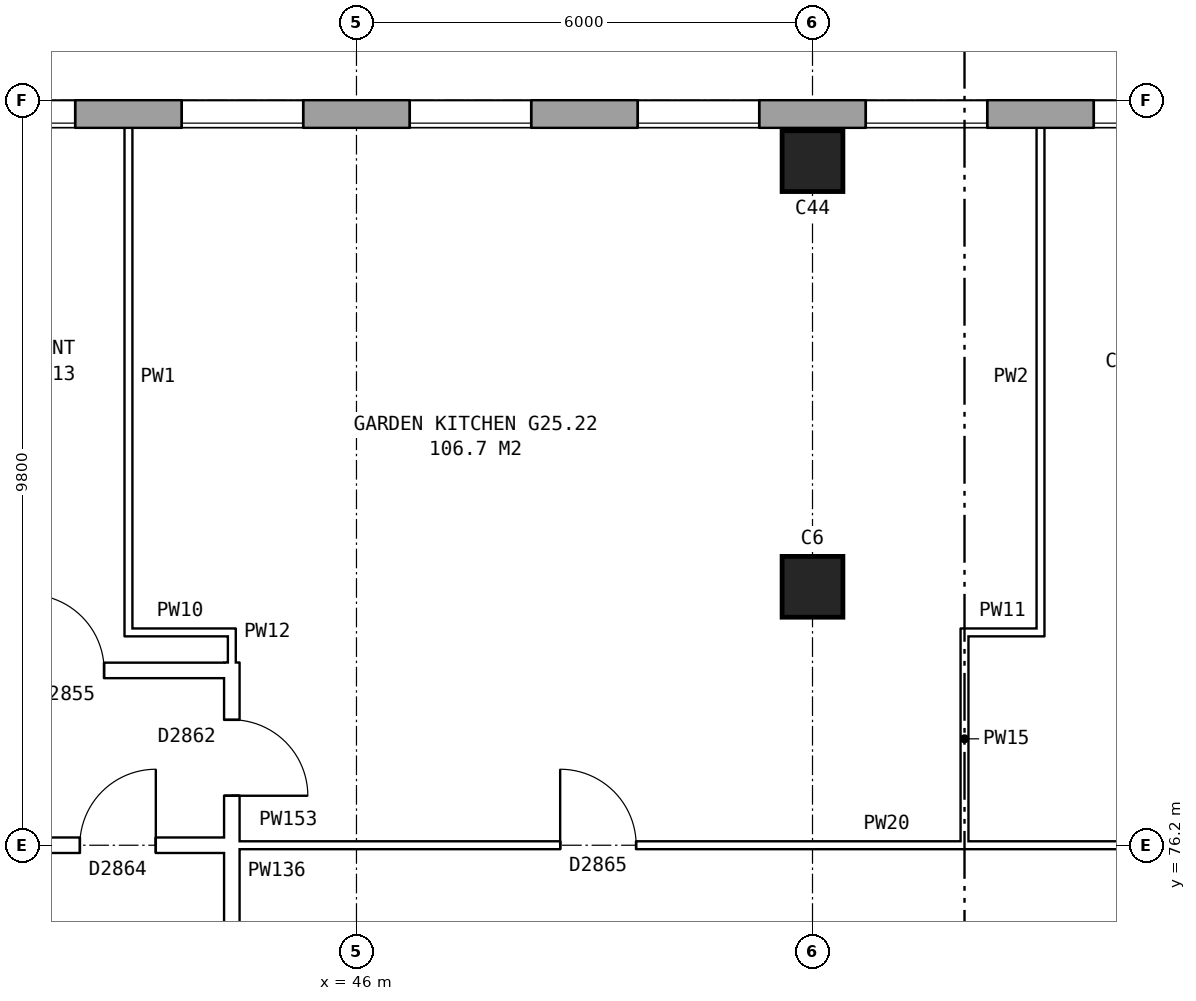
"""IFC4 building model, lengths in metres.
Left out: names, types, materials, properties, quantities, classifications, styles, units other than length and angle.
Written with IfcOpenShell. Run it as: python <this file> out.ifc"""

import sys

from ifc_helpers import new_model, si_unit, direction, frame, frame_2d, origin, origin_2d, place, context, subcontext, project, spatial, rectangle, extrude, element, fill, save


model = new_model("IFC4")
c1 = context("Model", 3, precision=1e-05, world=origin(), true_north=direction((0.0, 1.0)))
c2 = subcontext(c1, "Body", "Model", "MODEL_VIEW")
j1 = project(units=[si_unit("LENGTHUNIT", "METRE"), si_unit("PLANEANGLEUNIT", "RADIAN")], contexts=[c1])
p1 = place(None, origin())
s1 = spatial("IfcSite", under=j1, at=p1, CompositionType="ELEMENT")
p2 = place(p1, origin())
s2 = spatial("IfcBuilding", under=s1, at=p2, CompositionType="ELEMENT")
p3 = place(p2, frame((0.0, 0.0, 90.2)))
s3 = spatial("IfcBuildingStorey", under=s2, at=p3, CompositionType="ELEMENT", Elevation=90.2)
for number, where, z_axis, x_axis in (
    (1, (52.0, 79.6, 0.0), (0.0, 0.0, 1.0), (1.0, 0.0, 0.0)),
    (2, (52.0, 85.2, 0.0), (0.0, 0.0, 1.0), (1.0, 0.0, 0.0)),
):
    element("IfcColumn", number, at=place(p3, frame(where, z_axis=z_axis, x_axis=x_axis)), inside=s3, PredefinedType="COLUMN", context=c2, shape_type="SweptSolid", body=[
        extrude(rectangle(XDim=0.8, YDim=0.8, at=origin_2d()), origin(), (0.0, 0.0, 1.0), 5.6),
    ])
p4 = place(p3, frame((72.925, 85.82, 0.0), z_axis=(0.0, 0.0, 1.0), x_axis=(-1.0, 0.0, 0.0)))
e3 = element("IfcWall", 3, at=p4, inside=s3, PredefinedType="STANDARD", context=c2, shape_type="SweptSolid", body=[
    extrude(rectangle(XDim=44.851, YDim=0.36, at=frame_2d((22.425, 0.0))), origin(), (0.0, 0.0, 1.0), 5.6),
])
p5 = place(p4, frame((0.625, 0.0, 0.15)))
e4 = element("IfcOpeningElement", 4, at=p5, cuts=e3, PredefinedType="OPENING", context=c2, shape_type="SweptSolid", body=[
    extrude(rectangle(XDim=1.6, YDim=2.4, at=frame_2d((0.8, 1.2))), frame((0.0, 0.19, 0.0), z_axis=(0.0, -1.0, 0.0), x_axis=(1.0, 0.0, 0.0)), (0.0, 0.0, 1.0), 0.38),
])
p6 = place(p4, frame((3.625, 0.0, 0.15)))
e5 = element("IfcOpeningElement", 5, at=p6, cuts=e3, PredefinedType="OPENING", context=c2, shape_type="SweptSolid", body=[
    extrude(rectangle(XDim=1.6, YDim=2.4, at=frame_2d((0.8, 1.2))), frame((0.0, 0.19, 0.0), z_axis=(0.0, -1.0, 0.0), x_axis=(1.0, 0.0, 0.0)), (0.0, 0.0, 1.0), 0.38),
])
p7 = place(p4, frame((6.625, 0.0, 0.15)))
e6 = element("IfcOpeningElement", 6, at=p7, cuts=e3, PredefinedType="OPENING", context=c2, shape_type="SweptSolid", body=[
    extrude(rectangle(XDim=1.6, YDim=2.4, at=frame_2d((0.8, 1.2))), frame((0.0, 0.19, 0.0), z_axis=(0.0, -1.0, 0.0), x_axis=(1.0, 0.0, 0.0)), (0.0, 0.0, 1.0), 0.38),
])
p8 = place(p4, frame((9.625, 0.0, 0.15)))
e7 = element("IfcOpeningElement", 7, at=p8, cuts=e3, PredefinedType="OPENING", context=c2, shape_type="SweptSolid", body=[
    extrude(rectangle(XDim=1.6, YDim=2.4, at=frame_2d((0.8, 1.2))), frame((0.0, 0.19, 0.0), z_axis=(0.0, -1.0, 0.0), x_axis=(1.0, 0.0, 0.0)), (0.0, 0.0, 1.0), 0.38),
])
p9 = place(p4, frame((12.625, 0.0, 0.15)))
e8 = element("IfcOpeningElement", 8, at=p9, cuts=e3, PredefinedType="OPENING", context=c2, shape_type="SweptSolid", body=[
    extrude(rectangle(XDim=1.6, YDim=2.4, at=frame_2d((0.8, 1.2))), frame((0.0, 0.19, 0.0), z_axis=(0.0, -1.0, 0.0), x_axis=(1.0, 0.0, 0.0)), (0.0, 0.0, 1.0), 0.38),
])
p10 = place(p4, frame((15.625, 0.0, 0.15)))
e9 = element("IfcOpeningElement", 9, at=p10, cuts=e3, PredefinedType="OPENING", context=c2, shape_type="SweptSolid", body=[
    extrude(rectangle(XDim=1.6, YDim=2.4, at=frame_2d((0.8, 1.2))), frame((0.0, 0.19, 0.0), z_axis=(0.0, -1.0, 0.0), x_axis=(1.0, 0.0, 0.0)), (0.0, 0.0, 1.0), 0.38),
])
p11 = place(p4, frame((18.625, 0.0, 0.15)))
e10 = element("IfcOpeningElement", 10, at=p11, cuts=e3, PredefinedType="OPENING", context=c2, shape_type="SweptSolid", body=[
    extrude(rectangle(XDim=1.6, YDim=2.4, at=frame_2d((0.8, 1.2))), frame((0.0, 0.19, 0.0), z_axis=(0.0, -1.0, 0.0), x_axis=(1.0, 0.0, 0.0)), (0.0, 0.0, 1.0), 0.38),
])
p12 = place(p4, frame((21.625, 0.0, 0.15)))
e11 = element("IfcOpeningElement", 11, at=p12, cuts=e3, PredefinedType="OPENING", context=c2, shape_type="SweptSolid", body=[
    extrude(rectangle(XDim=1.6, YDim=2.4, at=frame_2d((0.8, 1.2))), frame((0.0, 0.19, 0.0), z_axis=(0.0, -1.0, 0.0), x_axis=(1.0, 0.0, 0.0)), (0.0, 0.0, 1.0), 0.38),
])
p13 = place(p4, frame((24.625, 0.0, 0.15)))
e12 = element("IfcOpeningElement", 12, at=p13, cuts=e3, PredefinedType="OPENING", context=c2, shape_type="SweptSolid", body=[
    extrude(rectangle(XDim=1.6, YDim=2.4, at=frame_2d((0.8, 1.2))), frame((0.0, 0.19, 0.0), z_axis=(0.0, -1.0, 0.0), x_axis=(1.0, 0.0, 0.0)), (0.0, 0.0, 1.0), 0.38),
])
p14 = place(p4, frame((27.625, 0.0, 0.15)))
e13 = element("IfcOpeningElement", 13, at=p14, cuts=e3, PredefinedType="OPENING", context=c2, shape_type="SweptSolid", body=[
    extrude(rectangle(XDim=1.6, YDim=2.4, at=frame_2d((0.8, 1.2))), frame((0.0, 0.19, 0.0), z_axis=(0.0, -1.0, 0.0), x_axis=(1.0, 0.0, 0.0)), (0.0, 0.0, 1.0), 0.38),
])
p15 = place(p4, frame((30.625, 0.0, 0.15)))
e14 = element("IfcOpeningElement", 14, at=p15, cuts=e3, PredefinedType="OPENING", context=c2, shape_type="SweptSolid", body=[
    extrude(rectangle(XDim=1.6, YDim=2.4, at=frame_2d((0.8, 1.2))), frame((0.0, 0.19, 0.0), z_axis=(0.0, -1.0, 0.0), x_axis=(1.0, 0.0, 0.0)), (0.0, 0.0, 1.0), 0.38),
])
p16 = place(p4, frame((33.625, 0.0, 0.15)))
e15 = element("IfcOpeningElement", 15, at=p16, cuts=e3, PredefinedType="OPENING", context=c2, shape_type="SweptSolid", body=[
    extrude(rectangle(XDim=1.6, YDim=2.4, at=frame_2d((0.8, 1.2))), frame((0.0, 0.19, 0.0), z_axis=(0.0, -1.0, 0.0), x_axis=(1.0, 0.0, 0.0)), (0.0, 0.0, 1.0), 0.38),
])
p17 = place(p4, frame((36.625, 0.0, 0.15)))
e16 = element("IfcOpeningElement", 16, at=p17, cuts=e3, PredefinedType="OPENING", context=c2, shape_type="SweptSolid", body=[
    extrude(rectangle(XDim=1.6, YDim=2.4, at=frame_2d((0.8, 1.2))), frame((0.0, 0.19, 0.0), z_axis=(0.0, -1.0, 0.0), x_axis=(1.0, 0.0, 0.0)), (0.0, 0.0, 1.0), 0.38),
])
p18 = place(p4, frame((39.625, 0.0, 0.15)))
e17 = element("IfcOpeningElement", 17, at=p18, cuts=e3, PredefinedType="OPENING", context=c2, shape_type="SweptSolid", body=[
    extrude(rectangle(XDim=1.6, YDim=2.4, at=frame_2d((0.8, 1.2))), frame((0.0, 0.19, 0.0), z_axis=(0.0, -1.0, 0.0), x_axis=(1.0, 0.0, 0.0)), (0.0, 0.0, 1.0), 0.38),
])
p19 = place(p4, frame((42.625, 0.0, 0.15)))
e18 = element("IfcOpeningElement", 18, at=p19, cuts=e3, PredefinedType="OPENING", context=c2, shape_type="SweptSolid", body=[
    extrude(rectangle(XDim=1.6, YDim=2.4, at=frame_2d((0.8, 1.2))), frame((0.0, 0.19, 0.0), z_axis=(0.0, -1.0, 0.0), x_axis=(1.0, 0.0, 0.0)), (0.0, 0.0, 1.0), 0.38),
])
p20 = place(p3, frame((44.36, 63.9, 0.0), z_axis=(0.0, 0.0, 1.0), x_axis=(0.0, 1.0, 0.0)))
e19 = element("IfcWall", 19, at=p20, inside=s3, PredefinedType="PARTITIONING", context=c2, shape_type="SweptSolid", body=[
    extrude(rectangle(XDim=12.2, YDim=0.2, at=frame_2d((6.1, 0.0))), origin(), (0.0, 0.0, 1.0), 5.6),
])
p21 = place(p20, frame((5.1, 0.0, 0.0)))
e20 = element("IfcOpeningElement", 20, at=p21, cuts=e19, PredefinedType="OPENING", context=c2, shape_type="SweptSolid", body=[
    extrude(rectangle(XDim=2.0, YDim=2.1, at=frame_2d((1.0, 1.05))), frame((0.0, 0.11, 0.0), z_axis=(0.0, -1.0, 0.0), x_axis=(1.0, 0.0, 0.0)), (0.0, 0.0, 1.0), 0.22),
])
p22 = place(p3, frame((41.36, 76.2, 0.0), z_axis=(0.0, 0.0, 1.0), x_axis=(1.0, 0.0, 0.0)))
e21 = element("IfcWall", 21, at=p22, inside=s3, PredefinedType="PARTITIONING", context=c2, shape_type="SweptSolid", body=[
    extrude(rectangle(XDim=3.1, YDim=0.2, at=frame_2d((1.55, 0.0))), origin(), (0.0, 0.0, 1.0), 5.6),
])
p23 = place(p22, frame((1.0, 0.0, 0.0)))
e22 = element("IfcOpeningElement", 22, at=p23, cuts=e21, PredefinedType="OPENING", context=c2, shape_type="SweptSolid", body=[
    extrude(rectangle(XDim=1.0, YDim=2.1, at=frame_2d((0.5, 1.05))), frame((0.0, 0.11, 0.0), z_axis=(0.0, -1.0, 0.0), x_axis=(1.0, 0.0, 0.0)), (0.0, 0.0, 1.0), 0.22),
])
p24 = place(p3, frame((44.26, 76.2, 0.0), z_axis=(0.0, 0.0, 1.0), x_axis=(1.0, 0.0, 0.0)))
e23 = element("IfcWall", 23, at=p24, inside=s3, PredefinedType="PARTITIONING", context=c2, shape_type="SweptSolid", body=[
    extrude(rectangle(XDim=19.38, YDim=0.1, at=frame_2d((9.69, 0.0))), origin(), (0.0, 0.0, 1.0), 5.6),
])
p25 = place(p24, frame((4.42, 0.0, 0.0)))
e24 = element("IfcOpeningElement", 24, at=p25, cuts=e23, PredefinedType="OPENING", context=c2, shape_type="SweptSolid", body=[
    extrude(rectangle(XDim=1.0, YDim=2.1, at=frame_2d((0.5, 1.05))), frame((0.0, 0.06, 0.0), z_axis=(0.0, -1.0, 0.0), x_axis=(1.0, 0.0, 0.0)), (0.0, 0.0, 1.0), 0.12),
])
p26 = place(p24, frame((14.06, 0.0, 0.0)))
e25 = element("IfcOpeningElement", 25, at=p26, cuts=e23, PredefinedType="OPENING", context=c2, shape_type="SweptSolid", body=[
    extrude(rectangle(XDim=1.0, YDim=2.1, at=frame_2d((0.5, 1.05))), frame((0.0, 0.06, 0.0), z_axis=(0.0, -1.0, 0.0), x_axis=(1.0, 0.0, 0.0)), (0.0, 0.0, 1.0), 0.12),
])
p27 = place(p3, frame((25.24, 78.5, 0.0), z_axis=(0.0, 0.0, 1.0), x_axis=(1.0, 0.0, 0.0)))
e26 = element("IfcWall", 26, at=p27, inside=s3, PredefinedType="PARTITIONING", context=c2, shape_type="SweptSolid", body=[
    extrude(rectangle(XDim=19.22, YDim=0.2, at=frame_2d((9.61, 0.0))), origin(), (0.0, 0.0, 1.0), 5.6),
])
p28 = place(p27, frame((0.99, 0.0, 0.0)))
e27 = element("IfcOpeningElement", 27, at=p28, cuts=e26, PredefinedType="OPENING", context=c2, shape_type="SweptSolid", body=[
    extrude(rectangle(XDim=0.9, YDim=2.1, at=frame_2d((0.45, 1.05))), frame((0.0, 0.11, 0.0), z_axis=(0.0, -1.0, 0.0), x_axis=(1.0, 0.0, 0.0)), (0.0, 0.0, 1.0), 0.22),
])
p29 = place(p27, frame((3.81, 0.0, 0.0)))
e28 = element("IfcOpeningElement", 28, at=p29, cuts=e26, PredefinedType="OPENING", context=c2, shape_type="SweptSolid", body=[
    extrude(rectangle(XDim=0.9, YDim=2.1, at=frame_2d((0.45, 1.05))), frame((0.0, 0.11, 0.0), z_axis=(0.0, -1.0, 0.0), x_axis=(1.0, 0.0, 0.0)), (0.0, 0.0, 1.0), 0.22),
])
p30 = place(p27, frame((6.81, 0.0, 0.0)))
e29 = element("IfcOpeningElement", 29, at=p30, cuts=e26, PredefinedType="OPENING", context=c2, shape_type="SweptSolid", body=[
    extrude(rectangle(XDim=0.9, YDim=2.1, at=frame_2d((0.45, 1.05))), frame((0.0, 0.11, 0.0), z_axis=(0.0, -1.0, 0.0), x_axis=(1.0, 0.0, 0.0)), (0.0, 0.0, 1.0), 0.22),
])
p31 = place(p27, frame((11.26, 0.0, 0.0)))
e30 = element("IfcOpeningElement", 30, at=p31, cuts=e26, PredefinedType="OPENING", context=c2, shape_type="SweptSolid", body=[
    extrude(rectangle(XDim=1.0, YDim=2.1, at=frame_2d((0.5, 1.05))), frame((0.0, 0.11, 0.0), z_axis=(0.0, -1.0, 0.0), x_axis=(1.0, 0.0, 0.0)), (0.0, 0.0, 1.0), 0.22),
])
p32 = place(p27, frame((16.44, 0.0, 0.0)))
e31 = element("IfcOpeningElement", 31, at=p32, cuts=e26, PredefinedType="OPENING", context=c2, shape_type="SweptSolid", body=[
    extrude(rectangle(XDim=1.0, YDim=2.1, at=frame_2d((0.5, 1.05))), frame((0.0, 0.11, 0.0), z_axis=(0.0, -1.0, 0.0), x_axis=(1.0, 0.0, 0.0)), (0.0, 0.0, 1.0), 0.22),
])
p33 = place(p3, frame((42.95, 79.0, 0.0), z_axis=(0.0, 0.0, 1.0), x_axis=(1.0, 0.0, 0.0)))
e32 = element("IfcWall", 32, at=p33, inside=s3, PredefinedType="PARTITIONING", context=c2, shape_type="SweptSolid", body=[
    extrude(rectangle(XDim=1.46, YDim=0.1, at=frame_2d((0.73, 0.0))), origin(), (0.0, 0.0, 1.0), 5.6),
])
p34 = place(p3, frame((53.95, 79.0, 0.0), z_axis=(0.0, 0.0, 1.0), x_axis=(1.0, 0.0, 0.0)))
e33 = element("IfcWall", 33, at=p34, inside=s3, PredefinedType="PARTITIONING", context=c2, shape_type="SweptSolid", body=[
    extrude(rectangle(XDim=1.1, YDim=0.1, at=frame_2d((0.55, 0.0))), origin(), (0.0, 0.0, 1.0), 5.6),
])
p35 = place(p3, frame((43.0, 78.95, 0.0), z_axis=(0.0, 0.0, 1.0), x_axis=(0.0, 1.0, 0.0)))
e34 = element("IfcWall", 34, at=p35, inside=s3, PredefinedType="PARTITIONING", context=c2, shape_type="SweptSolid", body=[
    extrude(rectangle(XDim=6.81, YDim=0.1, at=frame_2d((3.405, 0.0))), origin(), (0.0, 0.0, 1.0), 5.6),
])
p36 = place(p3, frame((44.36, 76.1, 0.0), z_axis=(0.0, 0.0, 1.0), x_axis=(0.0, 1.0, 0.0)))
e35 = element("IfcWall", 35, at=p36, inside=s3, PredefinedType="PARTITIONING", context=c2, shape_type="SweptSolid", body=[
    extrude(rectangle(XDim=2.502, YDim=0.2, at=frame_2d((1.251, 0.0))), origin(), (0.0, 0.0, 1.0), 5.6),
])
p37 = place(p36, frame((0.751, 0.0, 0.0)))
e36 = element("IfcOpeningElement", 36, at=p37, cuts=e35, PredefinedType="OPENING", context=c2, shape_type="SweptSolid", body=[
    extrude(rectangle(XDim=1.0, YDim=2.1, at=frame_2d((0.5, 1.05))), frame((0.0, 0.11, 0.0), z_axis=(0.0, -1.0, 0.0), x_axis=(1.0, 0.0, 0.0)), (0.0, 0.0, 1.0), 0.22),
])
p38 = place(p3, frame((44.36, 78.398, 0.0), z_axis=(0.0, 0.0, 1.0), x_axis=(0.0, 1.0, 0.0)))
e37 = element("IfcWall", 37, at=p38, inside=s3, PredefinedType="PARTITIONING", context=c2, shape_type="SweptSolid", body=[
    extrude(rectangle(XDim=0.652, YDim=0.1, at=frame_2d((0.326, 0.0))), origin(), (0.0, 0.0, 1.0), 5.6),
])
p39 = place(p3, frame((54.0, 76.15, 0.0), z_axis=(0.0, 0.0, 1.0), x_axis=(0.0, 1.0, 0.0)))
e38 = element("IfcWall", 38, at=p39, inside=s3, PredefinedType="PARTITIONING", context=c2, shape_type="SweptSolid", body=[
    extrude(rectangle(XDim=2.9, YDim=0.1, at=frame_2d((1.45, 0.0))), origin(), (0.0, 0.0, 1.0), 5.6),
])
p40 = place(p3, frame((55.0, 78.95, 0.0), z_axis=(0.0, 0.0, 1.0), x_axis=(0.0, 1.0, 0.0)))
e39 = element("IfcWall", 39, at=p40, inside=s3, PredefinedType="PARTITIONING", context=c2, shape_type="SweptSolid", body=[
    extrude(rectangle(XDim=6.81, YDim=0.1, at=frame_2d((3.405, 0.0))), origin(), (0.0, 0.0, 1.0), 5.6),
])
p41 = place(p10, origin())
e40 = element("IfcWindow", 40, at=p41, inside=s3, PartitioningType="SINGLE_PANEL", PredefinedType="WINDOW", context=c2, shape_type="SweptSolid", body=[
    extrude(rectangle(XDim=1.6, YDim=2.4, at=frame_2d((0.8, 1.2))), frame((0.0, 0.15, 0.0), z_axis=(0.0, -1.0, 0.0), x_axis=(1.0, 0.0, 0.0)), (0.0, 0.0, 1.0), 0.06),
])
fill(e9, e40)
p42 = place(p11, origin())
e41 = element("IfcWindow", 41, at=p42, inside=s3, PartitioningType="SINGLE_PANEL", PredefinedType="WINDOW", context=c2, shape_type="SweptSolid", body=[
    extrude(rectangle(XDim=1.6, YDim=2.4, at=frame_2d((0.8, 1.2))), frame((0.0, 0.15, 0.0), z_axis=(0.0, -1.0, 0.0), x_axis=(1.0, 0.0, 0.0)), (0.0, 0.0, 1.0), 0.06),
])
fill(e10, e41)
p43 = place(p12, origin())
e42 = element("IfcWindow", 42, at=p43, inside=s3, PartitioningType="SINGLE_PANEL", PredefinedType="WINDOW", context=c2, shape_type="SweptSolid", body=[
    extrude(rectangle(XDim=1.6, YDim=2.4, at=frame_2d((0.8, 1.2))), frame((0.0, 0.15, 0.0), z_axis=(0.0, -1.0, 0.0), x_axis=(1.0, 0.0, 0.0)), (0.0, 0.0, 1.0), 0.06),
])
fill(e11, e42)
p44 = place(p13, origin())
e43 = element("IfcWindow", 43, at=p44, inside=s3, PartitioningType="SINGLE_PANEL", PredefinedType="WINDOW", context=c2, shape_type="SweptSolid", body=[
    extrude(rectangle(XDim=1.6, YDim=2.4, at=frame_2d((0.8, 1.2))), frame((0.0, 0.15, 0.0), z_axis=(0.0, -1.0, 0.0), x_axis=(1.0, 0.0, 0.0)), (0.0, 0.0, 1.0), 0.06),
])
fill(e12, e43)
p45 = place(p14, origin())
e44 = element("IfcWindow", 44, at=p45, inside=s3, PartitioningType="SINGLE_PANEL", PredefinedType="WINDOW", context=c2, shape_type="SweptSolid", body=[
    extrude(rectangle(XDim=1.6, YDim=2.4, at=frame_2d((0.8, 1.2))), frame((0.0, 0.15, 0.0), z_axis=(0.0, -1.0, 0.0), x_axis=(1.0, 0.0, 0.0)), (0.0, 0.0, 1.0), 0.06),
])
fill(e13, e44)
p46 = place(p15, origin())
e45 = element("IfcWindow", 45, at=p46, inside=s3, PartitioningType="SINGLE_PANEL", PredefinedType="WINDOW", context=c2, shape_type="SweptSolid", body=[
    extrude(rectangle(XDim=1.6, YDim=2.4, at=frame_2d((0.8, 1.2))), frame((0.0, 0.15, 0.0), z_axis=(0.0, -1.0, 0.0), x_axis=(1.0, 0.0, 0.0)), (0.0, 0.0, 1.0), 0.06),
])
fill(e14, e45)
p47 = place(p23, origin())
e46 = element("IfcDoor", 46, at=p47, inside=s3, OperationType="SINGLE_SWING_RIGHT", PredefinedType="DOOR", context=c2, shape_type="SweptSolid", body=[
    extrude(rectangle(XDim=1.0, YDim=2.1, at=frame_2d((0.5, 1.05))), frame((0.0, 0.025, 0.0), z_axis=(0.0, -1.0, 0.0), x_axis=(1.0, 0.0, 0.0)), (0.0, 0.0, 1.0), 0.05),
])
fill(e22, e46)
p48 = place(p25, origin())
e47 = element("IfcDoor", 47, at=p48, inside=s3, OperationType="SINGLE_SWING_LEFT", PredefinedType="DOOR", context=c2, shape_type="SweptSolid", body=[
    extrude(rectangle(XDim=1.0, YDim=2.1, at=frame_2d((0.5, 1.05))), frame((0.0, 0.025, 0.0), z_axis=(0.0, -1.0, 0.0), x_axis=(1.0, 0.0, 0.0)), (0.0, 0.0, 1.0), 0.05),
])
fill(e24, e47)
p49 = place(p32, origin())
e48 = element("IfcDoor", 48, at=p49, inside=s3, OperationType="SINGLE_SWING_LEFT", PredefinedType="DOOR", context=c2, shape_type="SweptSolid", body=[
    extrude(rectangle(XDim=1.0, YDim=2.1, at=frame_2d((0.5, 1.05))), frame((0.0, 0.025, 0.0), z_axis=(0.0, -1.0, 0.0), x_axis=(1.0, 0.0, 0.0)), (0.0, 0.0, 1.0), 0.05),
])
fill(e31, e48)
p50 = place(p37, frame((1.0, 0.0, 0.0), z_axis=(0.0, 0.0, 1.0), x_axis=(-1.0, 0.0, 0.0)))
e49 = element("IfcDoor", 49, at=p50, inside=s3, OperationType="SINGLE_SWING_RIGHT", PredefinedType="DOOR", context=c2, shape_type="SweptSolid", body=[
    extrude(rectangle(XDim=1.0, YDim=2.1, at=frame_2d((0.5, 1.05))), frame((0.0, 0.025, 0.0), z_axis=(0.0, -1.0, 0.0), x_axis=(1.0, 0.0, 0.0)), (0.0, 0.0, 1.0), 0.05),
])
fill(e36, e49)
save(model, sys.argv[1])
